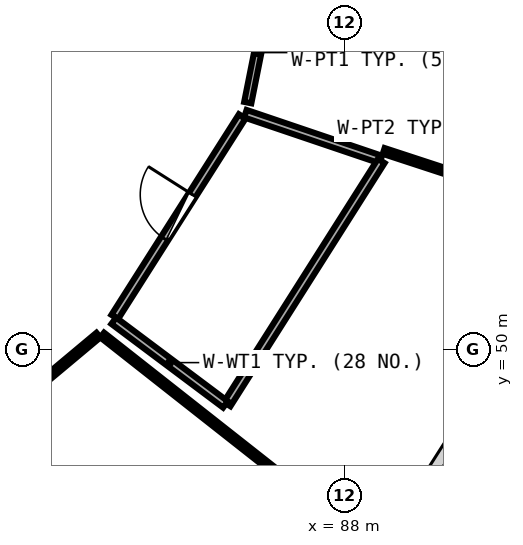
"""IFC4 building model, lengths in metres.
Left out: names, types, materials, properties, quantities, classifications, styles, units other than length and angle.
Written with IfcOpenShell. Run it as: python <this file> out.ifc"""

import sys

from ifc_helpers import new_model, si_unit, direction, frame, frame_2d, origin, place, context, subcontext, project, spatial, rectangle, extrude, element, fill, save


model = new_model("IFC4")
c1 = context("Model", 3, precision=1e-05, world=origin(), true_north=direction((0.0, 1.0)))
c2 = subcontext(c1, "Body", "Model", "MODEL_VIEW")
j1 = project(units=[si_unit("LENGTHUNIT", "METRE"), si_unit("PLANEANGLEUNIT", "RADIAN")], contexts=[c1])
p1 = place(None, origin())
s1 = spatial("IfcSite", under=j1, at=p1, CompositionType="ELEMENT")
p2 = place(p1, origin())
s2 = spatial("IfcBuilding", under=s1, at=p2, CompositionType="ELEMENT")
p3 = place(p2, frame((0.0, 0.0, 256.2)))
s3 = spatial("IfcBuildingStorey", under=s2, at=p3, CompositionType="ELEMENT", Elevation=256.2)
p4 = place(p3, frame((84.223, 50.533, 0.0), z_axis=(0.0, 0.0, 1.0), x_axis=(0.536434868975, 0.84394172272, 0.0)))
e1 = element("IfcWall", 1, at=p4, inside=s3, PredefinedType="PLUMBINGWALL", context=c2, shape_type="SweptSolid", body=[
    extrude(rectangle(XDim=3.908, YDim=0.13, at=frame_2d((1.954, 0.0))), origin(), (0.0, 0.0, 1.0), 3.075),
])
p5 = place(p4, frame((1.524, 0.0, 0.0)))
e2 = element("IfcOpeningElement", 2, at=p5, cuts=e1, PredefinedType="OPENING", context=c2, shape_type="SweptSolid", body=[
    extrude(rectangle(XDim=0.86, YDim=2.05, at=frame_2d((0.43, 1.025))), frame((0.0, 0.075, 0.0), z_axis=(0.0, -1.0, 0.0), x_axis=(1.0, 0.0, 0.0)), (0.0, 0.0, 1.0), 0.15),
])
p6 = place(p3, frame((86.411, 54.058, 0.0), z_axis=(0.0, 0.0, 1.0), x_axis=(0.195845174173, 0.980634828952, 0.0)))
e3 = element("IfcWall", 3, at=p6, inside=s3, PredefinedType="PARTITIONING", context=c2, shape_type="SweptSolid", body=[
    extrude(rectangle(XDim=3.812, YDim=0.12, at=frame_2d((1.906, 0.0))), origin(), (0.0, 0.0, 1.0), 3.48),
])
p7 = place(p6, frame((1.456, 0.0, 0.0)))
e4 = element("IfcOpeningElement", 4, at=p7, cuts=e3, PredefinedType="OPENING", context=c2, shape_type="SweptSolid", body=[
    extrude(rectangle(XDim=0.9, YDim=2.08, at=frame_2d((0.45, 1.04))), frame((0.0, 0.07, 0.0), z_axis=(0.0, -1.0, 0.0), x_axis=(1.0, 0.0, 0.0)), (0.0, 0.0, 1.0), 0.14),
])
p8 = place(p3, frame((81.852, 48.476, 0.0), z_axis=(0.0, 0.0, 1.0), x_axis=(0.767022676895, 0.641619991216, 0.0)))
e5 = element("IfcWall", 5, at=p8, inside=s3, PredefinedType="PARTITIONING", context=c2, shape_type="SweptSolid", body=[
    extrude(rectangle(XDim=2.741, YDim=0.1, at=frame_2d((1.371, 0.0))), origin(), (0.0, 0.0, 1.0), 3.075),
])
p9 = place(p3, frame((84.016, 50.235, 0.0), z_axis=(0.0, 0.0, 1.0), x_axis=(0.785736749878, -0.618561039745, 0.0)))
e6 = element("IfcWall", 6, at=p9, inside=s3, PredefinedType="PARTITIONING", context=c2, shape_type="SweptSolid", body=[
    extrude(rectangle(XDim=4.475, YDim=0.1, at=frame_2d((2.237, 0.0))), origin(), (0.0, 0.0, 1.0), 3.075),
])
p10 = place(p3, frame((86.371, 53.875, 0.0), z_axis=(0.0, 0.0, 1.0), x_axis=(0.947177643747, -0.320709387431, 0.0)))
e7 = element("IfcWall", 7, at=p10, inside=s3, PredefinedType="PLUMBINGWALL", context=c2, shape_type="SweptSolid", body=[
    extrude(rectangle(XDim=2.352, YDim=0.13, at=frame_2d((1.176, 0.0))), origin(), (0.0, 0.0, 1.0), 3.175),
])
p11 = place(p3, frame((88.606, 53.098, 0.0), z_axis=(0.0, 0.0, 1.0), x_axis=(-0.535433501212, -0.844577388864, 0.0)))
e8 = element("IfcWall", 8, at=p11, inside=s3, PredefinedType="PLUMBINGWALL", context=c2, shape_type="SweptSolid", body=[
    extrude(rectangle(XDim=4.735, YDim=0.13, at=frame_2d((2.368, 0.0))), origin(), (0.0, 0.0, 1.0), 3.075),
])
p12 = place(p3, frame((86.044, 49.094, 0.0), z_axis=(0.0, 0.0, 1.0), x_axis=(-0.800357274386, 0.599523338442, 0.0)))
e9 = element("IfcWall", 9, at=p12, inside=s3, PredefinedType="PLUMBINGWALL", context=c2, shape_type="SweptSolid", body=[
    extrude(rectangle(XDim=2.295, YDim=0.13, at=frame_2d((1.147, 0.0))), origin(), (0.0, 0.0, 1.0), 3.175),
])
p13 = place(p3, frame((90.751, 52.573, 0.0), z_axis=(0.0, 0.0, 1.0), x_axis=(-0.950301719956, 0.311330437073, 0.0)))
e10 = element("IfcWall", 10, at=p13, inside=s3, PredefinedType="PARTITIONING", context=c2, shape_type="SweptSolid", body=[
    extrude(rectangle(XDim=2.215, YDim=0.1, at=frame_2d((1.108, 0.0))), origin(), (0.0, 0.0, 1.0), 3.235),
])
p14 = place(p5, origin())
e11 = element("IfcDoor", 11, at=p14, inside=s3, OperationType="SINGLE_SWING_RIGHT", PredefinedType="DOOR", context=c2, shape_type="SweptSolid", body=[
    extrude(rectangle(XDim=0.86, YDim=2.05, at=frame_2d((0.43, 1.025))), frame((0.0, 0.025, 0.0), z_axis=(0.0, -1.0, 0.0), x_axis=(1.0, 0.0, 0.0)), (0.0, 0.0, 1.0), 0.05),
])
fill(e2, e11)
save(model, sys.argv[1])
